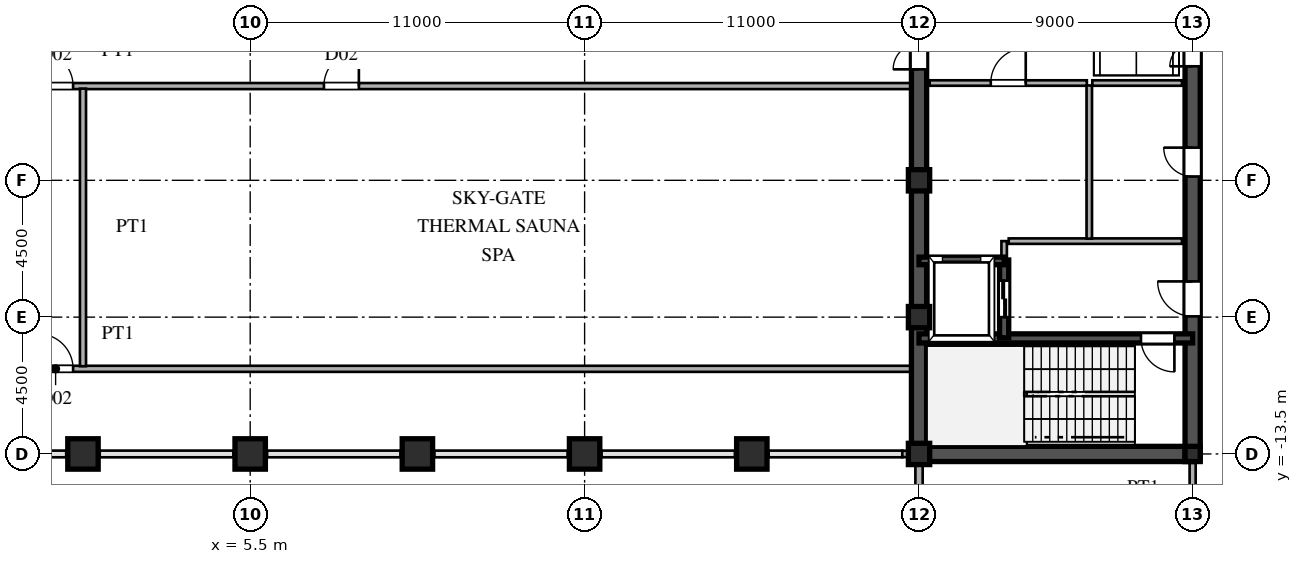
"""IFC4 building model, lengths in metres.
Left out: names, types, materials, properties, quantities, classifications, styles, units other than length and angle.
Written with IfcOpenShell. Run it as: python <this file> out.ifc"""

import sys

from ifc_helpers import new_model, si_unit, direction, frame, frame_2d, origin, origin_2d, place, context, subcontext, project, spatial, rectangle, hollow_rectangle, i_section, extrude, source, transform, mapped, element, fill, save


model = new_model("IFC4")
c1 = context("Model", 3, precision=1e-05, world=origin(), true_north=direction((0.0, 1.0)))
c2 = subcontext(c1, "Body", "Model", "MODEL_VIEW")
j1 = project(units=[si_unit("LENGTHUNIT", "METRE"), si_unit("PLANEANGLEUNIT", "RADIAN")], contexts=[c1])
p1 = place(None, origin())
s1 = spatial("IfcSite", under=j1, at=p1, CompositionType="ELEMENT")
p2 = place(p1, origin())
s2 = spatial("IfcBuilding", under=s1, at=p2, CompositionType="ELEMENT")
p3 = place(p2, frame((0.0, 0.0, 229.8)))
s3 = spatial("IfcBuildingStorey", under=s2, at=p3, CompositionType="ELEMENT", Elevation=229.8)
m1 = source(origin(), c2, "Body", "SweptSolid", [
    extrude(hollow_rectangle(XDim=0.7, YDim=0.7, WallThickness=0.03, at=origin_2d()), origin(), (0.0, 0.0, 1.0), 4.8),
])
for number, where, z_axis, x_axis in (
    (1, (27.5, -13.5, 0.0), (0.0, 0.0, 1.0), (1.0, 0.0, 0.0)),
    (2, (27.5, -9.0, 0.0), (0.0, 0.0, 1.0), (1.0, 0.0, 0.0)),
    (3, (27.5, -4.5, 0.0), (0.0, 0.0, 1.0), (1.0, 0.0, 0.0)),
):
    element("IfcColumn", number, at=place(p3, frame(where, z_axis=z_axis, x_axis=x_axis)), inside=s3, PredefinedType="COLUMN", context=c2, shape_type="MappedRepresentation", body=[
        mapped(m1, transform((0.0, 0.0, 0.0), scale=1.0)),
    ])
m2 = source(origin(), c2, "Body", "SweptSolid", [
    extrude(i_section(OverallWidth=0.5, OverallDepth=0.5, WebThickness=0.02, FlangeThickness=0.032, at=origin_2d()), origin(), (0.0, 0.0, 1.0), 4.8),
])
p4 = place(p3, frame((36.5, -13.5, 0.0), z_axis=(0.0, 0.0, 1.0), x_axis=(1.0, 0.0, 0.0)))
e4 = element("IfcColumn", 4, at=p4, inside=s3, PredefinedType="COLUMN", context=c2, shape_type="MappedRepresentation", body=[
    mapped(m2, transform((0.0, 0.0, 0.0), scale=1.0)),
])
m3 = source(origin(), c2, "Body", "SweptSolid", [
    extrude(hollow_rectangle(XDim=1.0, YDim=1.0, WallThickness=0.042, at=origin_2d()), origin(), (0.0, 0.0, 1.0), 6.06),
])
for number, where, z_axis, x_axis in (
    (5, (0.0, -13.5, -1.26), (0.0, 0.0, 1.0), (1.0, 0.0, 0.0)),
    (6, (5.5, -13.5, -1.26), (0.0, 0.0, 1.0), (1.0, 0.0, 0.0)),
    (7, (11.0, -13.5, -1.26), (0.0, 0.0, 1.0), (1.0, 0.0, 0.0)),
    (8, (16.5, -13.5, -1.26), (0.0, 0.0, 1.0), (1.0, 0.0, 0.0)),
    (9, (22.0, -13.5, -1.26), (0.0, 0.0, 1.0), (1.0, 0.0, 0.0)),
):
    element("IfcColumn", number, at=place(p3, frame(where, z_axis=z_axis, x_axis=x_axis)), inside=s3, PredefinedType="COLUMN", context=c2, shape_type="MappedRepresentation", body=[
        mapped(m3, transform((0.0, 0.0, 0.0), scale=1.0)),
    ])
p5 = place(p3, frame((27.5, -15.98, 0.0), z_axis=(0.0, 0.0, 1.0), x_axis=(0.0, 1.0, 0.0)))
e10 = element("IfcWall", 10, at=p5, inside=s3, PredefinedType="SOLIDWALL", context=c2, shape_type="SweptSolid", body=[
    extrude(rectangle(XDim=1.605, YDim=0.24, at=frame_2d((0.803, 0.0))), origin(), (0.0, 0.0, 1.0), 4.54),
])
p6 = place(p3, frame((27.5, -14.375, 0.0), z_axis=(0.0, 0.0, 1.0), x_axis=(0.0, 1.0, 0.0)))
e11 = element("IfcWall", 11, at=p6, inside=s3, PredefinedType="SOLIDWALL", context=c2, shape_type="SweptSolid", body=[
    extrude(rectangle(XDim=0.62, YDim=0.24, at=frame_2d((0.31, 0.0))), origin(), (0.0, 0.0, 1.0), 4.04),
])
for number, where, z_axis, x_axis in (
    (12, (-0.55, -13.5, 0.0), (0.0, 0.0, 1.0), (1.0, 0.0, 0.0)),
    (13, (4.95, -13.5, 0.0), (0.0, 0.0, 1.0), (1.0, 0.0, 0.0)),
    (14, (10.45, -13.5, 0.0), (0.0, 0.0, 1.0), (1.0, 0.0, 0.0)),
    (15, (15.95, -13.5, 0.0), (0.0, 0.0, 1.0), (1.0, 0.0, 0.0)),
    (16, (21.45, -13.5, 0.0), (0.0, 0.0, 1.0), (1.0, 0.0, 0.0)),
):
    element("IfcWall", number, at=place(p3, frame(where, z_axis=z_axis, x_axis=x_axis)), inside=s3, PredefinedType="SOLIDWALL", context=c2, shape_type="SweptSolid", body=[
        extrude(rectangle(XDim=1.1, YDim=0.21, at=frame_2d((0.55, 0.0))), origin(), (0.0, 0.0, 1.0), 2.54),
    ])
p7 = place(p3, frame((26.95, -13.5, 0.0), z_axis=(0.0, 0.0, 1.0), x_axis=(1.0, 0.0, 0.0)))
e17 = element("IfcWall", 17, at=p7, inside=s3, PredefinedType="SOLIDWALL", context=c2, shape_type="SweptSolid", body=[
    extrude(rectangle(XDim=0.54, YDim=0.21, at=frame_2d((0.27, 0.0))), origin(), (0.0, 0.0, 1.0), 2.54),
])
p8 = place(p3, frame((27.5, -13.5, 0.0), z_axis=(0.0, 0.0, 1.0), x_axis=(0.0, 1.0, 0.0)))
e18 = element("IfcWall", 18, at=p8, inside=s3, PredefinedType="SHEAR", context=c2, shape_type="SweptSolid", body=[
    extrude(rectangle(XDim=12.2, YDim=0.5, at=frame_2d((6.1, 0.0))), origin(), (0.0, 0.0, 1.0), 4.54),
])
p9 = place(p3, frame((27.5, -1.3, 0.0), z_axis=(0.0, 0.0, 1.0), x_axis=(0.0, 1.0, 0.0)))
e19 = element("IfcWall", 19, at=p9, inside=s3, PredefinedType="SHEAR", context=c2, shape_type="SweptSolid", body=[
    extrude(rectangle(XDim=2.6, YDim=0.5, at=frame_2d((1.3, 0.0))), origin(), (0.0, 0.0, 1.0), 4.54),
])
p10 = place(p9, frame((0.45, 0.0, 0.0)))
e20 = element("IfcOpeningElement", 20, at=p10, cuts=e19, PredefinedType="OPENING", context=c2, shape_type="SweptSolid", body=[
    extrude(rectangle(XDim=1.7, YDim=2.35, at=frame_2d((0.85, 1.175))), frame((0.0, 0.26, 0.0), z_axis=(0.0, -1.0, 0.0), x_axis=(1.0, 0.0, 0.0)), (0.0, 0.0, 1.0), 0.52),
])
p11 = place(p3, frame((27.5, -13.5, 0.0), z_axis=(0.0, 0.0, 1.0), x_axis=(1.0, 0.0, 0.0)))
e21 = element("IfcWall", 21, at=p11, inside=s3, PredefinedType="SHEAR", context=c2, shape_type="SweptSolid", body=[
    extrude(rectangle(XDim=9.0, YDim=0.5, at=frame_2d((4.5, 0.0))), origin(), (0.0, 0.0, 1.0), 4.54),
])
p12 = place(p3, frame((36.5, -13.65, 0.0), z_axis=(0.0, 0.0, 1.0), x_axis=(0.0, 1.0, 0.0)))
e22 = element("IfcWall", 22, at=p12, inside=s3, PredefinedType="SHEAR", context=c2, shape_type="SweptSolid", body=[
    extrude(rectangle(XDim=7.15, YDim=0.5, at=frame_2d((3.575, 0.0))), origin(), (0.0, 0.0, 1.0), 4.54),
])
p13 = place(p12, frame((4.675, 0.0, 0.0)))
e23 = element("IfcOpeningElement", 23, at=p13, cuts=e22, PredefinedType="OPENING", context=c2, shape_type="SweptSolid", body=[
    extrude(rectangle(XDim=1.15, YDim=2.2, at=frame_2d((0.575, 1.1))), frame((0.0, 0.26, 0.0), z_axis=(0.0, -1.0, 0.0), x_axis=(1.0, 0.0, 0.0)), (0.0, 0.0, 1.0), 0.52),
])
p14 = place(p3, frame((36.5, -1.3, 0.0), z_axis=(0.0, 0.0, 1.0), x_axis=(0.0, 1.0, 0.0)))
e24 = element("IfcWall", 24, at=p14, inside=s3, PredefinedType="SHEAR", context=c2, shape_type="SweptSolid", body=[
    extrude(rectangle(XDim=2.6, YDim=0.5, at=frame_2d((1.3, 0.0))), origin(), (0.0, 0.0, 1.0), 4.54),
])
p15 = place(p14, frame((0.55, 0.0, 0.0)))
e25 = element("IfcOpeningElement", 25, at=p15, cuts=e24, PredefinedType="OPENING", context=c2, shape_type="SweptSolid", body=[
    extrude(rectangle(XDim=1.5, YDim=2.3, at=frame_2d((0.75, 1.15))), frame((0.0, 0.26, 0.0), z_axis=(0.0, -1.0, 0.0), x_axis=(1.0, 0.0, 0.0)), (0.0, 0.0, 1.0), 0.52),
])
p16 = place(p3, frame((36.5, -6.5, 0.0), z_axis=(0.0, 0.0, 1.0), x_axis=(0.0, 1.0, 0.0)))
e26 = element("IfcWall", 26, at=p16, inside=s3, PredefinedType="SHEAR", context=c2, shape_type="SweptSolid", body=[
    extrude(rectangle(XDim=5.2, YDim=0.5, at=frame_2d((2.6, 0.0))), origin(), (0.0, 0.0, 1.0), 4.54),
])
p17 = place(p16, frame((2.125, 0.0, 0.0)))
e27 = element("IfcOpeningElement", 27, at=p17, cuts=e26, PredefinedType="OPENING", context=c2, shape_type="SweptSolid", body=[
    extrude(rectangle(XDim=0.95, YDim=2.15, at=frame_2d((0.475, 1.075))), frame((0.0, 0.26, 0.0), z_axis=(0.0, -1.0, 0.0), x_axis=(1.0, 0.0, 0.0)), (0.0, 0.0, 1.0), 0.52),
])
p18 = place(p3, frame((27.5, -9.7, 0.0), z_axis=(0.0, 0.0, 1.0), x_axis=(1.0, 0.0, 0.0)))
e28 = element("IfcWall", 28, at=p18, inside=s3, PredefinedType="SHEAR", context=c2, shape_type="SweptSolid", body=[
    extrude(rectangle(XDim=9.0, YDim=0.3, at=frame_2d((4.5, 0.0))), origin(), (0.0, 0.0, 1.0), 4.54),
])
p19 = place(p18, frame((7.3, 0.0, 0.0)))
e29 = element("IfcOpeningElement", 29, at=p19, cuts=e28, PredefinedType="OPENING", context=c2, shape_type="SweptSolid", body=[
    extrude(rectangle(XDim=1.1, YDim=2.2, at=frame_2d((0.55, 1.1))), frame((0.0, 0.16, 0.0), z_axis=(0.0, -1.0, 0.0), x_axis=(1.0, 0.0, 0.0)), (0.0, 0.0, 1.0), 0.32),
])
p20 = place(p3, frame((27.5, -7.15, 0.0), z_axis=(0.0, 0.0, 1.0), x_axis=(1.0, 0.0, 0.0)))
e30 = element("IfcWall", 30, at=p20, inside=s3, PredefinedType="SHEAR", context=c2, shape_type="SweptSolid", body=[
    extrude(rectangle(XDim=2.8, YDim=0.25, at=frame_2d((1.4, 0.0))), origin(), (0.0, 0.0, 1.0), 4.54),
])
p21 = place(p3, frame((30.3, -9.68, 0.0), z_axis=(0.0, 0.0, 1.0), x_axis=(0.0, 1.0, 0.0)))
e31 = element("IfcWall", 31, at=p21, inside=s3, PredefinedType="SHEAR", context=c2, shape_type="SweptSolid", body=[
    extrude(rectangle(XDim=2.56, YDim=0.3, at=frame_2d((1.28, 0.0))), origin(), (0.0, 0.0, 1.0), 4.54),
])
p22 = place(p21, frame((0.68, 0.0, 0.0)))
e32 = element("IfcOpeningElement", 32, at=p22, cuts=e31, PredefinedType="OPENING", context=c2, shape_type="SweptSolid", body=[
    extrude(rectangle(XDim=1.2, YDim=2.25, at=frame_2d((0.6, 1.125))), frame((0.0, 0.16, 0.0), z_axis=(0.0, -1.0, 0.0), x_axis=(1.0, 0.0, 0.0)), (0.0, 0.0, 1.0), 0.32),
])
p23 = place(p3, frame((30.45, -6.5, 0.0), z_axis=(0.0, 0.0, 1.0), x_axis=(1.0, 0.0, 0.0)))
e33 = element("IfcWall", 33, at=p23, inside=s3, PredefinedType="PARTITIONING", context=c2, shape_type="SweptSolid", body=[
    extrude(rectangle(XDim=5.7, YDim=0.18, at=frame_2d((2.85, 0.0))), origin(), (0.0, 0.0, 1.0), 4.54),
])
p24 = place(p3, frame((30.3, -7.12, 0.0), z_axis=(0.0, 0.0, 1.0), x_axis=(0.0, 1.0, 0.0)))
e34 = element("IfcWall", 34, at=p24, inside=s3, PredefinedType="PARTITIONING", context=c2, shape_type="SweptSolid", body=[
    extrude(rectangle(XDim=0.62, YDim=0.18, at=frame_2d((0.31, 0.0))), origin(), (0.0, 0.0, 1.0), 4.54),
])
p25 = place(p3, frame((33.1, -6.42, 0.0), z_axis=(0.0, 0.0, 1.0), x_axis=(0.0, 1.0, 0.0)))
e35 = element("IfcWall", 35, at=p25, inside=s3, PredefinedType="PARTITIONING", context=c2, shape_type="SweptSolid", body=[
    extrude(rectangle(XDim=5.04, YDim=0.18, at=frame_2d((2.52, 0.0))), origin(), (0.0, 0.0, 1.0), 4.54),
])
p26 = place(p3, frame((27.85, -1.3, 0.0), z_axis=(0.0, 0.0, 1.0), x_axis=(1.0, 0.0, 0.0)))
e36 = element("IfcWall", 36, at=p26, inside=s3, PredefinedType="PARTITIONING", context=c2, shape_type="SweptSolid", body=[
    extrude(rectangle(XDim=5.17, YDim=0.18, at=frame_2d((2.585, 0.0))), origin(), (0.0, 0.0, 1.0), 4.54),
])
p27 = place(p26, frame((2.01, 0.0, 0.0)))
e37 = element("IfcOpeningElement", 37, at=p27, cuts=e36, PredefinedType="OPENING", context=c2, shape_type="SweptSolid", body=[
    extrude(rectangle(XDim=1.15, YDim=2.2, at=frame_2d((0.575, 1.1))), frame((0.0, 0.1, 0.0), z_axis=(0.0, -1.0, 0.0), x_axis=(1.0, 0.0, 0.0)), (0.0, 0.0, 1.0), 0.2),
])
p28 = place(p3, frame((33.2, -1.3, 0.0), z_axis=(0.0, 0.0, 1.0), x_axis=(1.0, 0.0, 0.0)))
e38 = element("IfcWall", 38, at=p28, inside=s3, PredefinedType="PARTITIONING", context=c2, shape_type="SweptSolid", body=[
    extrude(rectangle(XDim=2.95, YDim=0.18, at=frame_2d((1.475, 0.0))), origin(), (0.0, 0.0, 1.0), 4.54),
])
p29 = place(p3, frame((-27.245, -10.7, 0.0), z_axis=(0.0, 0.0, 1.0), x_axis=(1.0, 0.0, 0.0)))
e39 = element("IfcWall", 39, at=p29, inside=s3, PredefinedType="PARTITIONING", context=c2, shape_type="SweptSolid", body=[
    extrude(rectangle(XDim=54.49, YDim=0.2, at=frame_2d((27.245, 0.0))), origin(), (0.0, 0.0, 1.0), 4.54),
])
p30 = place(p29, frame((25.77, 0.0, 0.0)))
e40 = element("IfcOpeningElement", 40, at=p30, cuts=e39, PredefinedType="OPENING", context=c2, shape_type="SweptSolid", body=[
    extrude(rectangle(XDim=1.15, YDim=2.2, at=frame_2d((0.575, 1.1))), frame((0.0, 0.11, 0.0), z_axis=(0.0, -1.0, 0.0), x_axis=(1.0, 0.0, 0.0)), (0.0, 0.0, 1.0), 0.22),
])
p31 = place(p3, frame((-27.245, -1.4, 0.0), z_axis=(0.0, 0.0, 1.0), x_axis=(1.0, 0.0, 0.0)))
e41 = element("IfcWall", 41, at=p31, inside=s3, PredefinedType="PARTITIONING", context=c2, shape_type="SweptSolid", body=[
    extrude(rectangle(XDim=54.49, YDim=0.2, at=frame_2d((27.245, 0.0))), origin(), (0.0, 0.0, 1.0), 4.54),
])
p32 = place(p31, frame((25.77, 0.0, 0.0)))
e42 = element("IfcOpeningElement", 42, at=p32, cuts=e41, PredefinedType="OPENING", context=c2, shape_type="SweptSolid", body=[
    extrude(rectangle(XDim=1.15, YDim=2.2, at=frame_2d((0.575, 1.1))), frame((0.0, 0.11, 0.0), z_axis=(0.0, -1.0, 0.0), x_axis=(1.0, 0.0, 0.0)), (0.0, 0.0, 1.0), 0.22),
])
p33 = place(p31, frame((17.67, 0.0, 0.0)))
e43 = element("IfcOpeningElement", 43, at=p33, cuts=e41, PredefinedType="OPENING", context=c2, shape_type="SweptSolid", body=[
    extrude(rectangle(XDim=1.15, YDim=2.2, at=frame_2d((0.575, 1.1))), frame((0.0, 0.11, 0.0), z_axis=(0.0, -1.0, 0.0), x_axis=(1.0, 0.0, 0.0)), (0.0, 0.0, 1.0), 0.22),
])
p34 = place(p31, frame((35.17, 0.0, 0.0)))
e44 = element("IfcOpeningElement", 44, at=p34, cuts=e41, PredefinedType="OPENING", context=c2, shape_type="SweptSolid", body=[
    extrude(rectangle(XDim=1.15, YDim=2.2, at=frame_2d((0.575, 1.1))), frame((0.0, 0.11, 0.0), z_axis=(0.0, -1.0, 0.0), x_axis=(1.0, 0.0, 0.0)), (0.0, 0.0, 1.0), 0.22),
])
p35 = place(p3, frame((0.0, -10.615, 0.0), z_axis=(0.0, 0.0, 1.0), x_axis=(0.0, 1.0, 0.0)))
e45 = element("IfcWall", 45, at=p35, inside=s3, PredefinedType="PARTITIONING", context=c2, shape_type="SweptSolid", body=[
    extrude(rectangle(XDim=7.635, YDim=0.2, at=frame_2d((3.817, 0.0))), origin(), (0.0, 0.0, 1.0), 3.44),
])
p36 = place(p3, frame((0.0, -2.98, 0.0), z_axis=(0.0, 0.0, 1.0), x_axis=(0.0, 1.0, 0.0)))
e46 = element("IfcWall", 46, at=p36, inside=s3, PredefinedType="PARTITIONING", context=c2, shape_type="SweptSolid", body=[
    extrude(rectangle(XDim=1.495, YDim=0.2, at=frame_2d((0.748, 0.0))), origin(), (0.0, 0.0, 1.0), 4.54),
])
p37 = place(p3, frame((36.5, -15.515, 0.0), z_axis=(0.0, 0.0, 1.0), x_axis=(0.0, 1.0, 0.0)))
e47 = element("IfcWall", 47, at=p37, inside=s3, PredefinedType="PARTITIONING", context=c2, shape_type="SweptSolid", body=[
    extrude(rectangle(XDim=1.76, YDim=0.2, at=frame_2d((0.88, 0.0))), origin(), (0.0, 0.0, 1.0), 3.94),
])
m4 = source(origin(), c2, "Body", "SweptSolid", [
    extrude(rectangle(XDim=1.7, YDim=2.35, at=frame_2d((0.85, 1.175))), frame((0.0, 0.025, 0.0), z_axis=(0.0, -1.0, 0.0), x_axis=(1.0, 0.0, 0.0)), (0.0, 0.0, 1.0), 0.05),
])
p38 = place(p10, origin())
e48 = element("IfcDoor", 48, at=p38, inside=s3, OperationType="DOUBLE_SWING_LEFT", PredefinedType="DOOR", context=c2, shape_type="MappedRepresentation", body=[
    mapped(m4, transform((0.0, 0.0, 0.0), scale=1.0)),
])
fill(e20, e48)
m5 = source(origin(), c2, "Body", "SweptSolid", [
    extrude(rectangle(XDim=1.15, YDim=2.2, at=frame_2d((0.575, 1.1))), frame((0.0, 0.025, 0.0), z_axis=(0.0, -1.0, 0.0), x_axis=(1.0, 0.0, 0.0)), (0.0, 0.0, 1.0), 0.05),
])
p39 = place(p13, origin())
e49 = element("IfcDoor", 49, at=p39, inside=s3, OperationType="SINGLE_SWING_RIGHT", PredefinedType="DOOR", context=c2, shape_type="MappedRepresentation", body=[
    mapped(m5, transform((0.0, 0.0, 0.0), scale=1.0)),
])
fill(e23, e49)
m6 = source(origin(), c2, "Body", "SweptSolid", [
    extrude(rectangle(XDim=1.5, YDim=2.3, at=frame_2d((0.75, 1.15))), frame((0.0, 0.025, 0.0), z_axis=(0.0, -1.0, 0.0), x_axis=(1.0, 0.0, 0.0)), (0.0, 0.0, 1.0), 0.05),
])
p40 = place(p15, origin())
e50 = element("IfcDoor", 50, at=p40, inside=s3, OperationType="DOUBLE_SWING_LEFT", PredefinedType="DOOR", context=c2, shape_type="MappedRepresentation", body=[
    mapped(m6, transform((0.0, 0.0, 0.0), scale=1.0)),
])
fill(e25, e50)
m7 = source(origin(), c2, "Body", "SweptSolid", [
    extrude(rectangle(XDim=0.95, YDim=2.15, at=frame_2d((0.475, 1.075))), frame((0.0, 0.025, 0.0), z_axis=(0.0, -1.0, 0.0), x_axis=(1.0, 0.0, 0.0)), (0.0, 0.0, 1.0), 0.05),
])
p41 = place(p17, origin())
e51 = element("IfcDoor", 51, at=p41, inside=s3, OperationType="SINGLE_SWING_RIGHT", PredefinedType="DOOR", context=c2, shape_type="MappedRepresentation", body=[
    mapped(m7, transform((0.0, 0.0, 0.0), scale=1.0)),
])
fill(e27, e51)
m8 = source(origin(), c2, "Body", "SweptSolid", [
    extrude(rectangle(XDim=1.1, YDim=2.2, at=frame_2d((0.55, 1.1))), frame((0.0, 0.025, 0.0), z_axis=(0.0, -1.0, 0.0), x_axis=(1.0, 0.0, 0.0)), (0.0, 0.0, 1.0), 0.05),
])
p42 = place(p19, frame((1.1, 0.0, 0.0), z_axis=(0.0, 0.0, 1.0), x_axis=(-1.0, 0.0, 0.0)))
e52 = element("IfcDoor", 52, at=p42, inside=s3, OperationType="SINGLE_SWING_RIGHT", PredefinedType="DOOR", context=c2, shape_type="MappedRepresentation", body=[
    mapped(m8, transform((0.0, 0.0, 0.0), scale=1.0)),
])
fill(e29, e52)
m9 = source(origin(), c2, "Body", "SweptSolid", [
    extrude(rectangle(XDim=1.2, YDim=2.25, at=frame_2d((0.6, 1.125))), frame((0.0, 0.025, 0.0), z_axis=(0.0, -1.0, 0.0), x_axis=(1.0, 0.0, 0.0)), (0.0, 0.0, 1.0), 0.05),
])
p43 = place(p22, origin())
e53 = element("IfcDoor", 53, at=p43, inside=s3, OperationType="DOUBLE_DOOR_SLIDING", PredefinedType="DOOR", context=c2, shape_type="MappedRepresentation", body=[
    mapped(m9, transform((0.0, 0.0, 0.0), scale=1.0)),
])
fill(e32, e53)
p44 = place(p27, origin())
e54 = element("IfcDoor", 54, at=p44, inside=s3, OperationType="SINGLE_SWING_RIGHT", PredefinedType="DOOR", context=c2, shape_type="MappedRepresentation", body=[
    mapped(m5, transform((0.0, 0.0, 0.0), scale=1.0)),
])
fill(e37, e54)
p45 = place(p30, origin())
e55 = element("IfcDoor", 55, at=p45, inside=s3, OperationType="SINGLE_SWING_LEFT", PredefinedType="DOOR", context=c2, shape_type="MappedRepresentation", body=[
    mapped(m5, transform((0.0, 0.0, 0.0), scale=1.0)),
])
fill(e40, e55)
p46 = place(p32, origin())
e56 = element("IfcDoor", 56, at=p46, inside=s3, OperationType="SINGLE_SWING_LEFT", PredefinedType="DOOR", context=c2, shape_type="MappedRepresentation", body=[
    mapped(m5, transform((0.0, 0.0, 0.0), scale=1.0)),
])
fill(e42, e56)
p47 = place(p34, origin())
e57 = element("IfcDoor", 57, at=p47, inside=s3, OperationType="SINGLE_SWING_RIGHT", PredefinedType="DOOR", context=c2, shape_type="MappedRepresentation", body=[
    mapped(m5, transform((0.0, 0.0, 0.0), scale=1.0)),
])
fill(e44, e57)
save(model, sys.argv[1])
